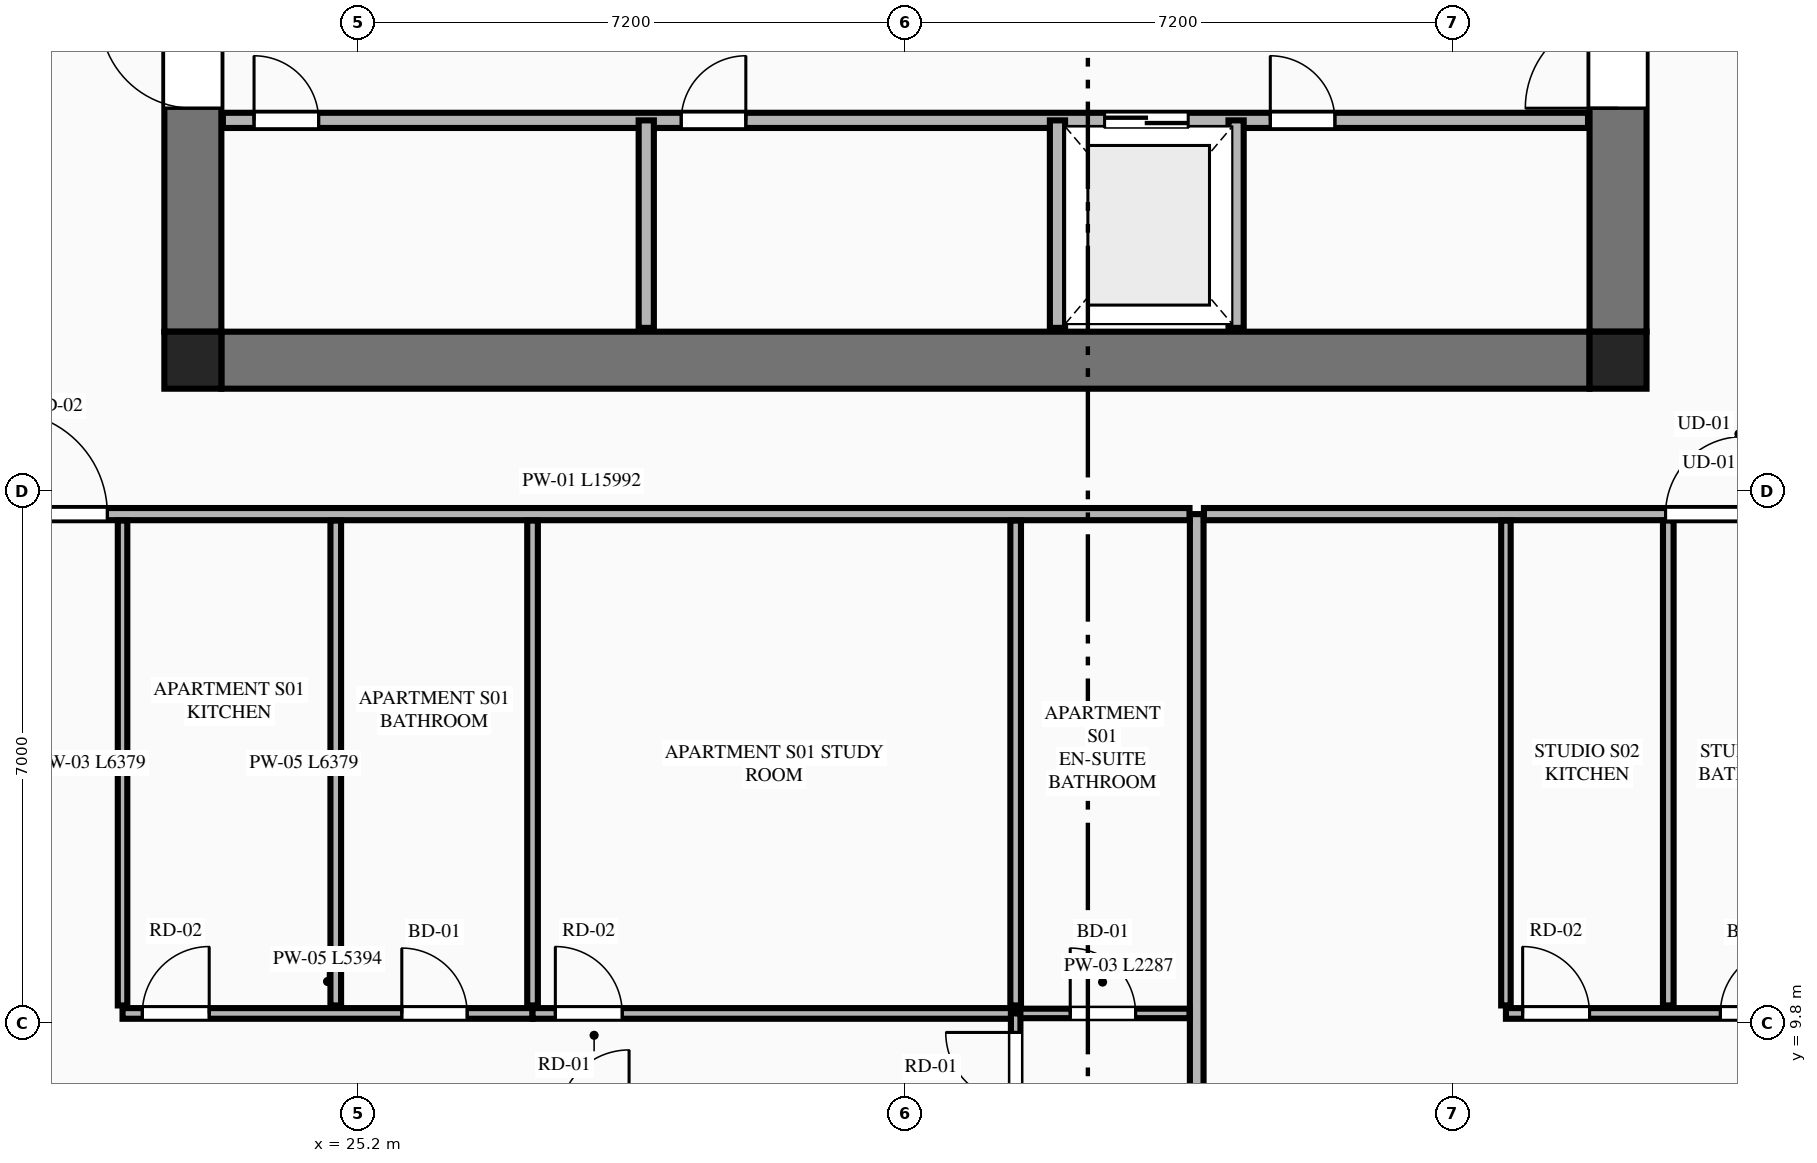
"""IFC4 building model, lengths in metres.
Left out: names, types, materials, properties, quantities, classifications, styles, units other than length and angle.
Written with IfcOpenShell. Run it as: python <this file> out.ifc"""

import sys

from ifc_helpers import new_model, si_unit, direction, frame, frame_2d, origin, origin_2d, place, context, subcontext, project, spatial, rectangle, extrude, element, fill, save


model = new_model("IFC4")
c1 = context("Model", 3, precision=1e-05, world=origin(), true_north=direction((0.0, 1.0)))
c2 = subcontext(c1, "Body", "Model", "MODEL_VIEW")
j1 = project(units=[si_unit("LENGTHUNIT", "METRE"), si_unit("PLANEANGLEUNIT", "RADIAN")], contexts=[c1])
p1 = place(None, origin())
s1 = spatial("IfcSite", under=j1, at=p1, CompositionType="ELEMENT")
p2 = place(p1, origin())
s2 = spatial("IfcBuilding", under=s1, at=p2, CompositionType="ELEMENT")
p3 = place(p2, frame((0.0, 0.0, 101.95)))
s3 = spatial("IfcBuildingStorey", under=s2, at=p3, CompositionType="ELEMENT", Elevation=101.95)
for number, where, z_axis, x_axis in (
    (1, (23.025, 18.525, 0.0), (0.0, 0.0, 1.0), (1.0, 0.0, 0.0)),
    (2, (41.775, 18.525, 0.0), (0.0, 0.0, 1.0), (1.0, 0.0, 0.0)),
):
    element("IfcColumn", number, at=place(p3, frame(where, z_axis=z_axis, x_axis=x_axis)), inside=s3, PredefinedType="COLUMN", context=c2, shape_type="SweptSolid", body=[
        extrude(rectangle(XDim=0.75, YDim=0.75, at=origin_2d()), origin(), (0.0, 0.0, 1.0), 3.55),
    ])
p4 = place(p3, frame((23.4, 18.525, 0.0), z_axis=(0.0, 0.0, 1.0), x_axis=(1.0, 0.0, 0.0)))
e3 = element("IfcWall", 3, at=p4, inside=s3, PredefinedType="SHEAR", context=c2, shape_type="SweptSolid", body=[
    extrude(rectangle(XDim=18.0, YDim=0.75, at=frame_2d((9.0, 0.0))), origin(), (0.0, 0.0, 1.0), 3.34),
])
p5 = place(p3, frame((23.025, 18.9, 0.0), z_axis=(0.0, 0.0, 1.0), x_axis=(0.0, 1.0, 0.0)))
e4 = element("IfcWall", 4, at=p5, inside=s3, PredefinedType="SHEAR", context=c2, shape_type="SweptSolid", body=[
    extrude(rectangle(XDim=14.0, YDim=0.75, at=frame_2d((7.0, 0.0))), origin(), (0.0, 0.0, 1.0), 3.34),
])
p6 = place(p5, frame((2.94, 0.0, 0.0)))
e5 = element("IfcOpeningElement", 5, at=p6, cuts=e4, PredefinedType="OPENING", context=c2, shape_type="SweptSolid", body=[
    extrude(rectangle(XDim=1.22, YDim=2.25, at=frame_2d((0.61, 1.125))), frame((0.0, 0.385, 0.0), z_axis=(0.0, -1.0, 0.0), x_axis=(1.0, 0.0, 0.0)), (0.0, 0.0, 1.0), 0.77),
])
p7 = place(p3, frame((41.775, 18.9, 0.0), z_axis=(0.0, 0.0, 1.0), x_axis=(0.0, 1.0, 0.0)))
e6 = element("IfcWall", 6, at=p7, inside=s3, PredefinedType="SHEAR", context=c2, shape_type="SweptSolid", body=[
    extrude(rectangle(XDim=14.0, YDim=0.75, at=frame_2d((7.0, 0.0))), origin(), (0.0, 0.0, 1.0), 3.34),
])
p8 = place(p7, frame((2.94, 0.0, 0.0)))
e7 = element("IfcOpeningElement", 7, at=p8, cuts=e6, PredefinedType="OPENING", context=c2, shape_type="SweptSolid", body=[
    extrude(rectangle(XDim=1.22, YDim=2.25, at=frame_2d((0.61, 1.125))), frame((0.0, 0.385, 0.0), z_axis=(0.0, -1.0, 0.0), x_axis=(1.0, 0.0, 0.0)), (0.0, 0.0, 1.0), 0.77),
])
p9 = place(p3, frame((23.42, 21.68, 0.0), z_axis=(0.0, 0.0, 1.0), x_axis=(1.0, 0.0, 0.0)))
e8 = element("IfcWall", 8, at=p9, inside=s3, PredefinedType="PLUMBINGWALL", context=c2, shape_type="SweptSolid", body=[
    extrude(rectangle(XDim=17.96, YDim=0.2, at=frame_2d((8.98, 0.0))), origin(), (0.0, 0.0, 1.0), 3.34),
])
p10 = place(p9, frame((11.6, 0.0, 0.0)))
e9 = element("IfcOpeningElement", 9, at=p10, cuts=e8, PredefinedType="OPENING", context=c2, shape_type="SweptSolid", body=[
    extrude(rectangle(XDim=1.1, YDim=2.2, at=frame_2d((0.55, 1.1))), frame((0.0, 0.11, 0.0), z_axis=(0.0, -1.0, 0.0), x_axis=(1.0, 0.0, 0.0)), (0.0, 0.0, 1.0), 0.22),
])
p11 = place(p9, frame((0.41, 0.0, 0.0)))
e10 = element("IfcOpeningElement", 10, at=p11, cuts=e8, PredefinedType="OPENING", context=c2, shape_type="SweptSolid", body=[
    extrude(rectangle(XDim=0.85, YDim=2.05, at=frame_2d((0.425, 1.025))), frame((0.0, 0.11, 0.0), z_axis=(0.0, -1.0, 0.0), x_axis=(1.0, 0.0, 0.0)), (0.0, 0.0, 1.0), 0.22),
])
p12 = place(p9, frame((6.03, 0.0, 0.0)))
e11 = element("IfcOpeningElement", 11, at=p12, cuts=e8, PredefinedType="OPENING", context=c2, shape_type="SweptSolid", body=[
    extrude(rectangle(XDim=0.85, YDim=2.05, at=frame_2d((0.425, 1.025))), frame((0.0, 0.11, 0.0), z_axis=(0.0, -1.0, 0.0), x_axis=(1.0, 0.0, 0.0)), (0.0, 0.0, 1.0), 0.22),
])
p13 = place(p9, frame((13.78, 0.0, 0.0)))
e12 = element("IfcOpeningElement", 12, at=p13, cuts=e8, PredefinedType="OPENING", context=c2, shape_type="SweptSolid", body=[
    extrude(rectangle(XDim=0.85, YDim=2.05, at=frame_2d((0.425, 1.025))), frame((0.0, 0.11, 0.0), z_axis=(0.0, -1.0, 0.0), x_axis=(1.0, 0.0, 0.0)), (0.0, 0.0, 1.0), 0.22),
])
for number, where, z_axis, x_axis in (
    (13, (34.4, 18.95, 0.0), (0.0, 0.0, 1.0), (0.0, 1.0, 0.0)),
    (14, (36.75, 18.95, 0.0), (0.0, 0.0, 1.0), (0.0, 1.0, 0.0)),
    (15, (28.99, 18.95, 0.0), (0.0, 0.0, 1.0), (0.0, 1.0, 0.0)),
):
    element("IfcWall", number, at=place(p3, frame(where, z_axis=z_axis, x_axis=x_axis)), inside=s3, PredefinedType="PLUMBINGWALL", context=c2, shape_type="SweptSolid", body=[
        extrude(rectangle(XDim=2.73, YDim=0.2, at=frame_2d((1.365, 0.0))), origin(), (0.0, 0.0, 1.0), 3.34),
    ])
p14 = place(p3, frame((36.232, 4.105, 0.0), z_axis=(0.0, 0.0, 1.0), x_axis=(0.0, 1.0, 0.0)))
e16 = element("IfcWall", 16, at=p14, inside=s3, PredefinedType="PARTITIONING", context=c2, shape_type="SweptSolid", body=[
    extrude(rectangle(XDim=12.395, YDim=0.18, at=frame_2d((6.198, 0.0))), origin(), (0.0, 0.0, 1.0), 2.722),
])
p15 = place(p3, frame((20.145, 16.5, 0.0), z_axis=(0.0, 0.0, 1.0), x_axis=(1.0, 0.0, 0.0)))
e17 = element("IfcWall", 17, at=p15, inside=s3, PredefinedType="PARTITIONING", context=c2, shape_type="SweptSolid", body=[
    extrude(rectangle(XDim=15.992, YDim=0.16, at=frame_2d((7.996, 0.0))), origin(), (0.0, 0.0, 1.0), 3.34),
])
p16 = place(p15, frame((0.405, 0.0, 0.0)))
e18 = element("IfcOpeningElement", 18, at=p16, cuts=e17, PredefinedType="OPENING", context=c2, shape_type="SweptSolid", body=[
    extrude(rectangle(XDim=1.35, YDim=2.35, at=frame_2d((0.675, 1.175))), frame((0.0, 0.09, 0.0), z_axis=(0.0, -1.0, 0.0), x_axis=(1.0, 0.0, 0.0)), (0.0, 0.0, 1.0), 0.18),
])
p17 = place(p3, frame((22.1, 10.036, 0.0), z_axis=(0.0, 0.0, 1.0), x_axis=(0.0, 1.0, 0.0)))
e19 = element("IfcWall", 19, at=p17, inside=s3, PredefinedType="PARTITIONING", context=c2, shape_type="SweptSolid", body=[
    extrude(rectangle(XDim=6.379, YDim=0.125, at=frame_2d((3.189, 0.0))), origin(), (0.0, 0.0, 1.0), 2.722),
])
p18 = place(p3, frame((22.1, 9.931, 0.0), z_axis=(0.0, 0.0, 1.0), x_axis=(1.0, 0.0, 0.0)))
e20 = element("IfcWall", 20, at=p18, inside=s3, PredefinedType="PLUMBINGWALL", context=c2, shape_type="SweptSolid", body=[
    extrude(rectangle(XDim=5.394, YDim=0.14, at=frame_2d((2.697, 0.0))), origin(), (0.0, 0.0, 1.0), 3.34),
])
p19 = place(p18, frame((3.674, 0.0, 0.0)))
e21 = element("IfcOpeningElement", 21, at=p19, cuts=e20, PredefinedType="OPENING", context=c2, shape_type="SweptSolid", body=[
    extrude(rectangle(XDim=0.86, YDim=2.1, at=frame_2d((0.43, 1.05))), frame((0.0, 0.08, 0.0), z_axis=(0.0, -1.0, 0.0), x_axis=(1.0, 0.0, 0.0)), (0.0, 0.0, 1.0), 0.16),
])
p20 = place(p18, frame((0.26, 0.0, 0.0)))
e22 = element("IfcOpeningElement", 22, at=p20, cuts=e20, PredefinedType="OPENING", context=c2, shape_type="SweptSolid", body=[
    extrude(rectangle(XDim=0.88, YDim=2.15, at=frame_2d((0.44, 1.075))), frame((0.0, 0.08, 0.0), z_axis=(0.0, -1.0, 0.0), x_axis=(1.0, 0.0, 0.0)), (0.0, 0.0, 1.0), 0.16),
])
p21 = place(p3, frame((27.494, 9.931, 0.0), z_axis=(0.0, 0.0, 1.0), x_axis=(1.0, 0.0, 0.0)))
e23 = element("IfcWall", 23, at=p21, inside=s3, PredefinedType="PLUMBINGWALL", context=c2, shape_type="SweptSolid", body=[
    extrude(rectangle(XDim=6.356, YDim=0.14, at=frame_2d((3.178, 0.0))), origin(), (0.0, 0.0, 1.0), 3.34),
])
p22 = place(p21, frame((0.3, 0.0, 0.0)))
e24 = element("IfcOpeningElement", 24, at=p22, cuts=e23, PredefinedType="OPENING", context=c2, shape_type="SweptSolid", body=[
    extrude(rectangle(XDim=0.88, YDim=2.15, at=frame_2d((0.44, 1.075))), frame((0.0, 0.08, 0.0), z_axis=(0.0, -1.0, 0.0), x_axis=(1.0, 0.0, 0.0)), (0.0, 0.0, 1.0), 0.16),
])
p23 = place(p3, frame((33.85, 9.931, 0.0), z_axis=(0.0, 0.0, 1.0), x_axis=(1.0, 0.0, 0.0)))
e25 = element("IfcWall", 25, at=p23, inside=s3, PredefinedType="PARTITIONING", context=c2, shape_type="SweptSolid", body=[
    extrude(rectangle(XDim=2.287, YDim=0.125, at=frame_2d((1.144, 0.0))), origin(), (0.0, 0.0, 1.0), 3.34),
])
p24 = place(p23, frame((0.718, 0.0, 0.0)))
e26 = element("IfcOpeningElement", 26, at=p24, cuts=e25, PredefinedType="OPENING", context=c2, shape_type="SweptSolid", body=[
    extrude(rectangle(XDim=0.86, YDim=2.1, at=frame_2d((0.43, 1.05))), frame((0.0, 0.073, 0.0), z_axis=(0.0, -1.0, 0.0), x_axis=(1.0, 0.0, 0.0)), (0.0, 0.0, 1.0), 0.145),
])
p25 = place(p3, frame((24.905, 10.036, 0.0), z_axis=(0.0, 0.0, 1.0), x_axis=(0.0, 1.0, 0.0)))
e27 = element("IfcWall", 27, at=p25, inside=s3, PredefinedType="PLUMBINGWALL", context=c2, shape_type="SweptSolid", body=[
    extrude(rectangle(XDim=6.379, YDim=0.14, at=frame_2d((3.189, 0.0))), origin(), (0.0, 0.0, 1.0), 3.34),
])
p26 = place(p3, frame((33.85, 8.601, 0.0), z_axis=(0.0, 0.0, 1.0), x_axis=(0.0, 1.0, 0.0)))
e28 = element("IfcWall", 28, at=p26, inside=s3, PredefinedType="PARTITIONING", context=c2, shape_type="SweptSolid", body=[
    extrude(rectangle(XDim=1.33, YDim=0.125, at=frame_2d((0.665, 0.0))), origin(), (0.0, 0.0, 1.0), 3.34),
])
p27 = place(p26, frame((0.16, 0.0, 0.0)))
e29 = element("IfcOpeningElement", 29, at=p27, cuts=e28, PredefinedType="OPENING", context=c2, shape_type="SweptSolid", body=[
    extrude(rectangle(XDim=0.92, YDim=2.15, at=frame_2d((0.46, 1.075))), frame((0.0, 0.073, 0.0), z_axis=(0.0, -1.0, 0.0), x_axis=(1.0, 0.0, 0.0)), (0.0, 0.0, 1.0), 0.145),
])
for number, where, z_axis, x_axis in (
    (30, (27.494, 10.036, 0.0), (0.0, 0.0, 1.0), (0.0, 1.0, 0.0)),
    (31, (33.85, 10.036, 0.0), (0.0, 0.0, 1.0), (0.0, 1.0, 0.0)),
):
    element("IfcWall", number, at=place(p3, frame(where, z_axis=z_axis, x_axis=x_axis)), inside=s3, PredefinedType="PLUMBINGWALL", context=c2, shape_type="SweptSolid", body=[
        extrude(rectangle(XDim=6.379, YDim=0.14, at=frame_2d((3.189, 0.0))), origin(), (0.0, 0.0, 1.0), 3.34),
    ])
p28 = place(p3, frame((36.327, 16.5, 0.0), z_axis=(0.0, 0.0, 1.0), x_axis=(1.0, 0.0, 0.0)))
e32 = element("IfcWall", 32, at=p28, inside=s3, PredefinedType="PARTITIONING", context=c2, shape_type="SweptSolid", body=[
    extrude(rectangle(XDim=8.328, YDim=0.16, at=frame_2d((4.164, 0.0))), origin(), (0.0, 0.0, 1.0), 3.34),
])
p29 = place(p28, frame((6.073, 0.0, 0.0)))
e33 = element("IfcOpeningElement", 33, at=p29, cuts=e32, PredefinedType="OPENING", context=c2, shape_type="SweptSolid", body=[
    extrude(rectangle(XDim=1.02, YDim=2.25, at=frame_2d((0.51, 1.125))), frame((0.0, 0.09, 0.0), z_axis=(0.0, -1.0, 0.0), x_axis=(1.0, 0.0, 0.0)), (0.0, 0.0, 1.0), 0.18),
])
p30 = place(p3, frame((40.3, 10.036, 0.0), z_axis=(0.0, 0.0, 1.0), x_axis=(0.0, 1.0, 0.0)))
e34 = element("IfcWall", 34, at=p30, inside=s3, PredefinedType="PARTITIONING", context=c2, shape_type="SweptSolid", body=[
    extrude(rectangle(XDim=6.379, YDim=0.125, at=frame_2d((3.189, 0.0))), origin(), (0.0, 0.0, 1.0), 3.34),
])
p31 = place(p3, frame((40.3, 9.931, 0.0), z_axis=(0.0, 0.0, 1.0), x_axis=(1.0, 0.0, 0.0)))
e35 = element("IfcWall", 35, at=p31, inside=s3, PredefinedType="PLUMBINGWALL", context=c2, shape_type="SweptSolid", body=[
    extrude(rectangle(XDim=4.355, YDim=0.14, at=frame_2d((2.177, 0.0))), origin(), (0.0, 0.0, 1.0), 3.34),
])
p32 = place(p31, frame((2.821, 0.0, 0.0)))
e36 = element("IfcOpeningElement", 36, at=p32, cuts=e35, PredefinedType="OPENING", context=c2, shape_type="SweptSolid", body=[
    extrude(rectangle(XDim=0.86, YDim=2.1, at=frame_2d((0.43, 1.05))), frame((0.0, 0.08, 0.0), z_axis=(0.0, -1.0, 0.0), x_axis=(1.0, 0.0, 0.0)), (0.0, 0.0, 1.0), 0.16),
])
p33 = place(p31, frame((0.22, 0.0, 0.0)))
e37 = element("IfcOpeningElement", 37, at=p33, cuts=e35, PredefinedType="OPENING", context=c2, shape_type="SweptSolid", body=[
    extrude(rectangle(XDim=0.88, YDim=2.15, at=frame_2d((0.44, 1.075))), frame((0.0, 0.08, 0.0), z_axis=(0.0, -1.0, 0.0), x_axis=(1.0, 0.0, 0.0)), (0.0, 0.0, 1.0), 0.16),
])
p34 = place(p3, frame((42.436, 10.036, 0.0), z_axis=(0.0, 0.0, 1.0), x_axis=(0.0, 1.0, 0.0)))
e38 = element("IfcWall", 38, at=p34, inside=s3, PredefinedType="PLUMBINGWALL", context=c2, shape_type="SweptSolid", body=[
    extrude(rectangle(XDim=6.379, YDim=0.14, at=frame_2d((3.189, 0.0))), origin(), (0.0, 0.0, 1.0), 2.722),
])
p35 = place(p6, origin())
e39 = element("IfcDoor", 39, at=p35, inside=s3, OperationType="SINGLE_SWING_RIGHT", PredefinedType="DOOR", context=c2, shape_type="SweptSolid", body=[
    extrude(rectangle(XDim=1.22, YDim=2.25, at=frame_2d((0.61, 1.125))), frame((0.0, 0.025, 0.0), z_axis=(0.0, -1.0, 0.0), x_axis=(1.0, 0.0, 0.0)), (0.0, 0.0, 1.0), 0.05),
])
fill(e5, e39)
p36 = place(p8, origin())
e40 = element("IfcDoor", 40, at=p36, inside=s3, OperationType="SINGLE_SWING_LEFT", PredefinedType="DOOR", context=c2, shape_type="SweptSolid", body=[
    extrude(rectangle(XDim=1.22, YDim=2.25, at=frame_2d((0.61, 1.125))), frame((0.0, 0.025, 0.0), z_axis=(0.0, -1.0, 0.0), x_axis=(1.0, 0.0, 0.0)), (0.0, 0.0, 1.0), 0.05),
])
fill(e7, e40)
p37 = place(p10, origin())
e41 = element("IfcDoor", 41, at=p37, inside=s3, OperationType="DOUBLE_DOOR_SLIDING", PredefinedType="DOOR", context=c2, shape_type="SweptSolid", body=[
    extrude(rectangle(XDim=1.1, YDim=2.2, at=frame_2d((0.55, 1.1))), frame((0.0, 0.025, 0.0), z_axis=(0.0, -1.0, 0.0), x_axis=(1.0, 0.0, 0.0)), (0.0, 0.0, 1.0), 0.05),
])
fill(e9, e41)
p38 = place(p11, origin())
e42 = element("IfcDoor", 42, at=p38, inside=s3, OperationType="SINGLE_SWING_LEFT", PredefinedType="DOOR", context=c2, shape_type="SweptSolid", body=[
    extrude(rectangle(XDim=0.85, YDim=2.05, at=frame_2d((0.425, 1.025))), frame((0.0, 0.025, 0.0), z_axis=(0.0, -1.0, 0.0), x_axis=(1.0, 0.0, 0.0)), (0.0, 0.0, 1.0), 0.05),
])
fill(e10, e42)
p39 = place(p12, origin())
e43 = element("IfcDoor", 43, at=p39, inside=s3, OperationType="SINGLE_SWING_RIGHT", PredefinedType="DOOR", context=c2, shape_type="SweptSolid", body=[
    extrude(rectangle(XDim=0.85, YDim=2.05, at=frame_2d((0.425, 1.025))), frame((0.0, 0.025, 0.0), z_axis=(0.0, -1.0, 0.0), x_axis=(1.0, 0.0, 0.0)), (0.0, 0.0, 1.0), 0.05),
])
fill(e11, e43)
p40 = place(p13, origin())
e44 = element("IfcDoor", 44, at=p40, inside=s3, OperationType="SINGLE_SWING_LEFT", PredefinedType="DOOR", context=c2, shape_type="SweptSolid", body=[
    extrude(rectangle(XDim=0.85, YDim=2.05, at=frame_2d((0.425, 1.025))), frame((0.0, 0.025, 0.0), z_axis=(0.0, -1.0, 0.0), x_axis=(1.0, 0.0, 0.0)), (0.0, 0.0, 1.0), 0.05),
])
fill(e12, e44)
p41 = place(p19, origin())
e45 = element("IfcDoor", 45, at=p41, inside=s3, OperationType="SINGLE_SWING_LEFT", PredefinedType="DOOR", context=c2, shape_type="SweptSolid", body=[
    extrude(rectangle(XDim=0.86, YDim=2.1, at=frame_2d((0.43, 1.05))), frame((0.0, 0.025, 0.0), z_axis=(0.0, -1.0, 0.0), x_axis=(1.0, 0.0, 0.0)), (0.0, 0.0, 1.0), 0.05),
])
fill(e21, e45)
p42 = place(p24, origin())
e46 = element("IfcDoor", 46, at=p42, inside=s3, OperationType="SINGLE_SWING_LEFT", PredefinedType="DOOR", context=c2, shape_type="SweptSolid", body=[
    extrude(rectangle(XDim=0.86, YDim=2.1, at=frame_2d((0.43, 1.05))), frame((0.0, 0.025, 0.0), z_axis=(0.0, -1.0, 0.0), x_axis=(1.0, 0.0, 0.0)), (0.0, 0.0, 1.0), 0.05),
])
fill(e26, e46)
p43 = place(p16, origin())
e47 = element("IfcDoor", 47, at=p43, inside=s3, OperationType="SINGLE_SWING_LEFT", PredefinedType="DOOR", context=c2, shape_type="SweptSolid", body=[
    extrude(rectangle(XDim=1.35, YDim=2.35, at=frame_2d((0.675, 1.175))), frame((0.0, 0.025, 0.0), z_axis=(0.0, -1.0, 0.0), x_axis=(1.0, 0.0, 0.0)), (0.0, 0.0, 1.0), 0.05),
])
fill(e18, e47)
p44 = place(p20, origin())
e48 = element("IfcDoor", 48, at=p44, inside=s3, OperationType="SINGLE_SWING_RIGHT", PredefinedType="DOOR", context=c2, shape_type="SweptSolid", body=[
    extrude(rectangle(XDim=0.88, YDim=2.15, at=frame_2d((0.44, 1.075))), frame((0.0, 0.025, 0.0), z_axis=(0.0, -1.0, 0.0), x_axis=(1.0, 0.0, 0.0)), (0.0, 0.0, 1.0), 0.05),
])
fill(e22, e48)
p45 = place(p22, origin())
e49 = element("IfcDoor", 49, at=p45, inside=s3, OperationType="SINGLE_SWING_LEFT", PredefinedType="DOOR", context=c2, shape_type="SweptSolid", body=[
    extrude(rectangle(XDim=0.88, YDim=2.15, at=frame_2d((0.44, 1.075))), frame((0.0, 0.025, 0.0), z_axis=(0.0, -1.0, 0.0), x_axis=(1.0, 0.0, 0.0)), (0.0, 0.0, 1.0), 0.05),
])
fill(e24, e49)
p46 = place(p27, origin())
e50 = element("IfcDoor", 50, at=p46, inside=s3, OperationType="SINGLE_SWING_RIGHT", PredefinedType="DOOR", context=c2, shape_type="SweptSolid", body=[
    extrude(rectangle(XDim=0.92, YDim=2.15, at=frame_2d((0.46, 1.075))), frame((0.0, 0.025, 0.0), z_axis=(0.0, -1.0, 0.0), x_axis=(1.0, 0.0, 0.0)), (0.0, 0.0, 1.0), 0.05),
])
fill(e29, e50)
p47 = place(p32, origin())
e51 = element("IfcDoor", 51, at=p47, inside=s3, OperationType="SINGLE_SWING_RIGHT", PredefinedType="DOOR", context=c2, shape_type="SweptSolid", body=[
    extrude(rectangle(XDim=0.86, YDim=2.1, at=frame_2d((0.43, 1.05))), frame((0.0, 0.025, 0.0), z_axis=(0.0, -1.0, 0.0), x_axis=(1.0, 0.0, 0.0)), (0.0, 0.0, 1.0), 0.05),
])
fill(e36, e51)
p48 = place(p29, origin())
e52 = element("IfcDoor", 52, at=p48, inside=s3, OperationType="SINGLE_SWING_RIGHT", PredefinedType="DOOR", context=c2, shape_type="SweptSolid", body=[
    extrude(rectangle(XDim=1.02, YDim=2.25, at=frame_2d((0.51, 1.125))), frame((0.0, 0.025, 0.0), z_axis=(0.0, -1.0, 0.0), x_axis=(1.0, 0.0, 0.0)), (0.0, 0.0, 1.0), 0.05),
])
fill(e33, e52)
p49 = place(p33, origin())
e53 = element("IfcDoor", 53, at=p49, inside=s3, OperationType="SINGLE_SWING_LEFT", PredefinedType="DOOR", context=c2, shape_type="SweptSolid", body=[
    extrude(rectangle(XDim=0.88, YDim=2.15, at=frame_2d((0.44, 1.075))), frame((0.0, 0.025, 0.0), z_axis=(0.0, -1.0, 0.0), x_axis=(1.0, 0.0, 0.0)), (0.0, 0.0, 1.0), 0.05),
])
fill(e37, e53)
save(model, sys.argv[1])
